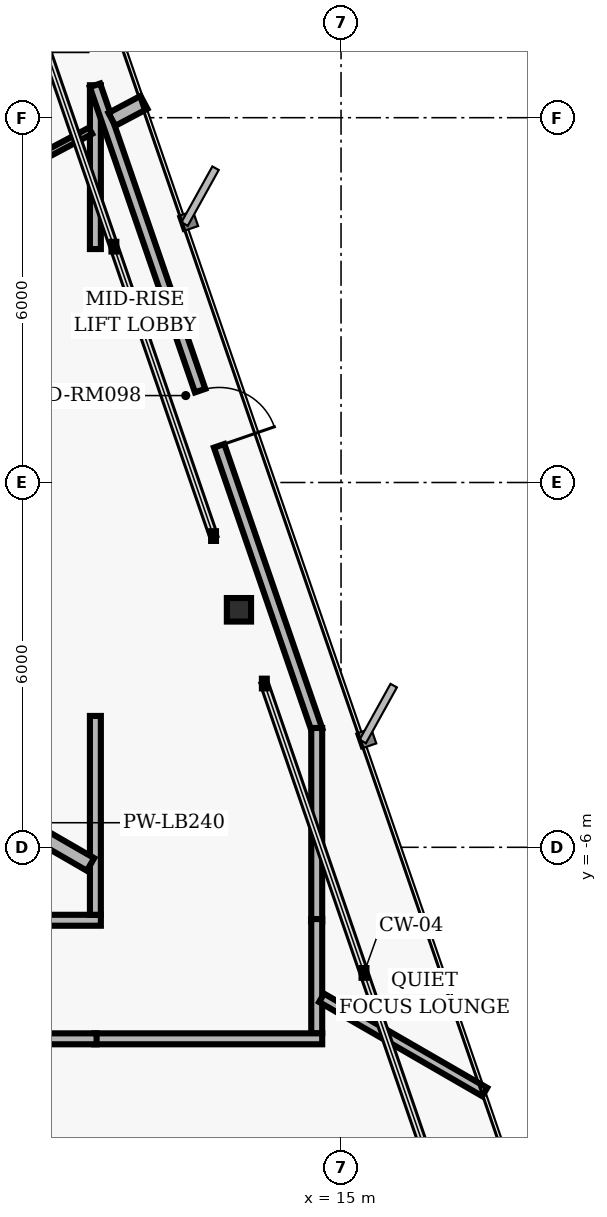
"""IFC4 building model, lengths in metres.
Left out: names, types, materials, properties, quantities, classifications, styles, units other than length and angle.
Written with IfcOpenShell. Run it as: python <this file> out.ifc"""

import sys

from ifc_helpers import new_model, si_unit, direction, frame, frame_2d, origin, origin_2d, place, context, subcontext, project, spatial, rectangle, i_section, extrude, element, fill, save


model = new_model("IFC4")
c1 = context("Model", 3, precision=1e-05, world=origin(), true_north=direction((0.0, 1.0)))
c2 = subcontext(c1, "Body", "Model", "MODEL_VIEW")
j1 = project(units=[si_unit("LENGTHUNIT", "METRE"), si_unit("PLANEANGLEUNIT", "RADIAN")], contexts=[c1])
p1 = place(None, origin())
s1 = spatial("IfcSite", under=j1, at=p1, CompositionType="ELEMENT")
p2 = place(p1, origin())
s2 = spatial("IfcBuilding", under=s1, at=p2, CompositionType="ELEMENT")
p3 = place(p2, frame((0.0, 0.0, 162.4)))
s3 = spatial("IfcBuildingStorey", under=s2, at=p3, CompositionType="ELEMENT", Elevation=162.4)
p4 = place(p3, frame((13.321, -2.094, 0.0), z_axis=(0.0, 0.0, 1.0), x_axis=(1.0, 0.0, 0.0)))
e1 = element("IfcColumn", 1, at=p4, inside=s3, PredefinedType="COLUMN", context=c2, shape_type="SweptSolid", body=[
    extrude(i_section(OverallWidth=0.398, OverallDepth=0.387, WebThickness=0.021, FlangeThickness=0.033, FilletRadius=0.018, at=origin_2d()), origin(), (0.0, 0.0, 1.0), 3.04),
])
p5 = place(p3, frame((5.53, -7.2, 0.0), z_axis=(0.0, 0.0, 1.0), x_axis=(1.0, 0.0, 0.0)))
e2 = element("IfcWall", 2, at=p5, inside=s3, PredefinedType="PARTITIONING", context=c2, shape_type="SweptSolid", body=[
    extrude(rectangle(XDim=5.52, YDim=0.18, at=frame_2d((2.76, 0.0))), origin(), (0.0, 0.0, 1.0), 2.33),
])
p6 = place(p5, frame((2.25, 0.0, 0.0)))
e3 = element("IfcOpeningElement", 3, at=p6, cuts=e2, PredefinedType="OPENING", context=c2, shape_type="SweptSolid", body=[
    extrude(rectangle(XDim=1.02, YDim=2.02, at=frame_2d((0.51, 1.01))), frame((0.0, 0.1, 0.0), z_axis=(0.0, -1.0, 0.0), x_axis=(1.0, 0.0, 0.0)), (0.0, 0.0, 1.0), 0.2),
])
p7 = place(p3, frame((10.96, -7.11, 0.0), z_axis=(0.0, 0.0, 1.0), x_axis=(0.0, 1.0, 0.0)))
e4 = element("IfcWall", 4, at=p7, inside=s3, PredefinedType="PARTITIONING", context=c2, shape_type="SweptSolid", body=[
    extrude(rectangle(XDim=3.271, YDim=0.18, at=frame_2d((1.635, 0.0))), origin(), (0.0, 0.0, 1.0), 2.763),
])
p8 = place(p3, frame((10.96, 3.84, 0.0), z_axis=(0.0, 0.0, 1.0), x_axis=(0.0, 1.0, 0.0)))
e5 = element("IfcWall", 5, at=p8, inside=s3, PredefinedType="PARTITIONING", context=c2, shape_type="SweptSolid", body=[
    extrude(rectangle(XDim=2.694, YDim=0.18, at=frame_2d((1.347, 0.0))), origin(), (0.0, 0.0, 1.0), 2.33),
])
p9 = place(p3, frame((10.954, 6.533, 0.0), z_axis=(0.0, 0.0, 1.0), x_axis=(0.325553439946, -0.945523642084, 0.0)))
e6 = element("IfcWall", 6, at=p9, inside=s3, PredefinedType="PARTITIONING", context=c2, shape_type="SweptSolid", body=[
    extrude(rectangle(XDim=11.22, YDim=0.18, at=frame_2d((5.61, 0.0))), origin(), (0.0, 0.0, 1.0), 2.763),
])
p10 = place(p9, frame((5.311, 0.0, 0.0)))
e7 = element("IfcOpeningElement", 7, at=p10, cuts=e6, PredefinedType="OPENING", context=c2, shape_type="SweptSolid", body=[
    extrude(rectangle(XDim=0.96, YDim=2.02, at=frame_2d((0.48, 1.01))), frame((0.0, 0.1, 0.0), z_axis=(0.0, -1.0, 0.0), x_axis=(1.0, 0.0, 0.0)), (0.0, 0.0, 1.0), 0.2),
])
p11 = place(p3, frame((14.6, -4.038, 0.0), z_axis=(0.0, 0.0, 1.0), x_axis=(0.0, -1.0, 0.0)))
e8 = element("IfcWall", 8, at=p11, inside=s3, PredefinedType="PARTITIONING", context=c2, shape_type="SweptSolid", body=[
    extrude(rectangle(XDim=3.182, YDim=0.18, at=frame_2d((1.591, 0.0))), origin(), (0.0, 0.0, 1.0), 2.763),
])
p12 = place(p3, frame((14.6, -7.18, 0.0), z_axis=(0.0, 0.0, 1.0), x_axis=(0.0, -1.0, 0.0)))
e9 = element("IfcWall", 9, at=p12, inside=s3, PredefinedType="PARTITIONING", context=c2, shape_type="SweptSolid", body=[
    extrude(rectangle(XDim=1.88, YDim=0.18, at=frame_2d((0.94, 0.0))), origin(), (0.0, 0.0, 1.0), 2.763),
])
p13 = place(p3, frame((14.69, -9.15, 0.0), z_axis=(0.0, 0.0, 1.0), x_axis=(-1.0, 0.0, 0.0)))
e10 = element("IfcWall", 10, at=p13, inside=s3, PredefinedType="PARTITIONING", context=c2, shape_type="SweptSolid", body=[
    extrude(rectangle(XDim=3.75, YDim=0.18, at=frame_2d((1.875, 0.0))), origin(), (0.0, 0.0, 1.0), 2.763),
])
p14 = place(p3, frame((10.98, -9.15, 0.0), z_axis=(0.0, 0.0, 1.0), x_axis=(-1.0, 0.0, 0.0)))
e11 = element("IfcWall", 11, at=p14, inside=s3, PredefinedType="PARTITIONING", context=c2, shape_type="SweptSolid", body=[
    extrude(rectangle(XDim=17.5, YDim=0.18, at=frame_2d((8.75, 0.0))), origin(), (0.0, 0.0, 1.0), 2.33),
])
p15 = place(p14, frame((13.791, 0.0, 0.0)))
e12 = element("IfcOpeningElement", 12, at=p15, cuts=e11, PredefinedType="OPENING", context=c2, shape_type="SweptSolid", body=[
    extrude(rectangle(XDim=0.96, YDim=2.02, at=frame_2d((0.48, 1.01))), frame((0.0, 0.1, 0.0), z_axis=(0.0, -1.0, 0.0), x_axis=(1.0, 0.0, 0.0)), (0.0, 0.0, 1.0), 0.2),
])
p16 = place(p14, frame((5.302, 0.0, 0.0)))
e13 = element("IfcOpeningElement", 13, at=p16, cuts=e11, PredefinedType="OPENING", context=c2, shape_type="SweptSolid", body=[
    extrude(rectangle(XDim=0.96, YDim=2.02, at=frame_2d((0.48, 1.01))), frame((0.0, 0.1, 0.0), z_axis=(0.0, -1.0, 0.0), x_axis=(1.0, 0.0, 0.0)), (0.0, 0.0, 1.0), 0.2),
])
p17 = place(p3, frame((8.504, -4.91, 0.0), z_axis=(0.0, 0.0, 1.0), x_axis=(0.866010685746, -0.500025491523, 0.0)))
e14 = element("IfcWall", 14, at=p17, inside=s3, PredefinedType="PARTITIONING", context=c2, shape_type="SweptSolid", body=[
    extrude(rectangle(XDim=2.743, YDim=0.24, at=frame_2d((1.372, 0.0))), origin(), (0.0, 0.0, 1.0), 2.763),
])
p18 = place(p3, frame((14.68, -8.476, 0.0), z_axis=(0.0, 0.0, 1.0), x_axis=(0.866047813034, -0.499961184032, 0.0)))
e15 = element("IfcWall", 15, at=p18, inside=s3, PredefinedType="PARTITIONING", context=c2, shape_type="SweptSolid", body=[
    extrude(rectangle(XDim=3.098, YDim=0.16, at=frame_2d((1.549, 0.0))), origin(), (0.0, 0.0, 1.0), 2.763),
])
p19 = place(p3, frame((9.234, 4.91, 0.0), z_axis=(0.0, 0.0, 1.0), x_axis=(0.882932473202, 0.46949999762, 0.0)))
e16 = element("IfcWall", 16, at=p19, inside=s3, PredefinedType="MOVABLE", context=c2, shape_type="SweptSolid", body=[
    extrude(rectangle(XDim=1.864, YDim=0.115, at=frame_2d((0.932, 0.0))), origin(), (0.0, 0.0, 1.0), 2.763),
])
p20 = place(p3, frame((11.231, 5.972, 0.0), z_axis=(0.0, 0.0, 1.0), x_axis=(0.882951671469, 0.469463891956, 0.0)))
e17 = element("IfcWall", 17, at=p20, inside=s3, PredefinedType="PARTITIONING", context=c2, shape_type="SweptSolid", body=[
    extrude(rectangle(XDim=0.597, YDim=0.24, at=frame_2d((0.299, 0.0))), origin(), (0.0, 0.0, 1.0), 2.763),
])
p21 = place(p10, origin())
e18 = element("IfcDoor", 18, at=p21, inside=s3, OperationType="SINGLE_SWING_RIGHT", PredefinedType="DOOR", context=c2, shape_type="SweptSolid", body=[
    extrude(rectangle(XDim=0.96, YDim=2.02, at=frame_2d((0.48, 1.01))), frame((0.0, 0.025, 0.0), z_axis=(0.0, -1.0, 0.0), x_axis=(1.0, 0.0, 0.0)), (0.0, 0.0, 1.0), 0.05),
])
fill(e7, e18)
save(model, sys.argv[1])
